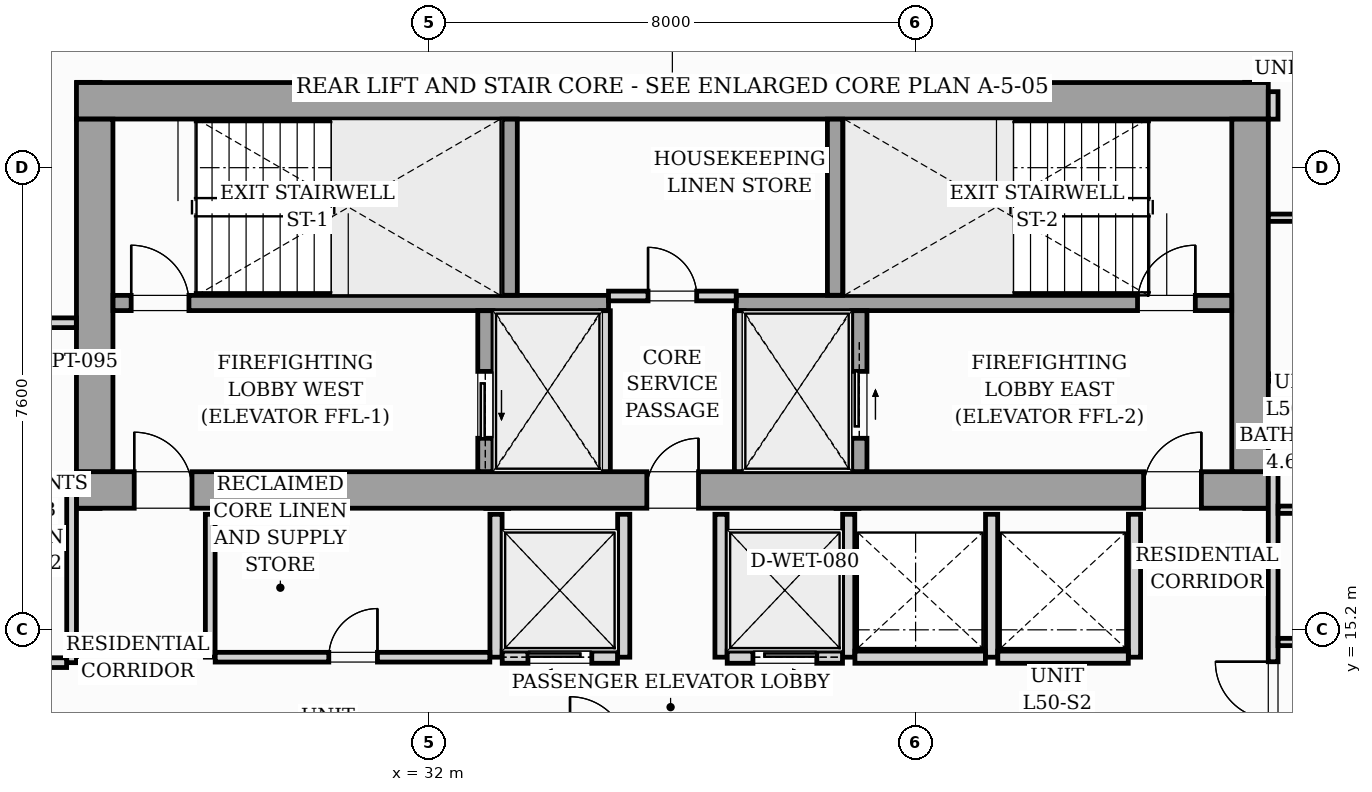
"""IFC4 building model, lengths in metres.
Left out: names, types, materials, properties, quantities, classifications, styles, units other than length and angle.
Written with IfcOpenShell. Run it as: python <this file> out.ifc"""

import sys

from ifc_helpers import new_model, si_unit, direction, frame, frame_2d, origin, origin_2d, place, context, subcontext, project, spatial, rectangle, i_section, extrude, source, transform, mapped, element, fill, save


model = new_model("IFC4")
c1 = context("Model", 3, precision=1e-05, world=origin(), true_north=direction((0.0, 1.0)))
c2 = subcontext(c1, "Body", "Model", "MODEL_VIEW")
j1 = project(units=[si_unit("LENGTHUNIT", "METRE"), si_unit("PLANEANGLEUNIT", "RADIAN")], contexts=[c1])
p1 = place(None, origin())
s1 = spatial("IfcSite", under=j1, at=p1, CompositionType="ELEMENT")
p2 = place(p1, origin())
s2 = spatial("IfcBuilding", under=s1, at=p2, CompositionType="ELEMENT")
p3 = place(p2, frame((0.0, 0.0, 176.2)))
s3 = spatial("IfcBuildingStorey", under=s2, at=p3, CompositionType="ELEMENT", Elevation=176.2)
m1 = source(origin(), c2, "Body", "SweptSolid", [
    extrude(i_section(OverallWidth=0.416, OverallDepth=0.446, WebThickness=0.039, FlangeThickness=0.063, FilletRadius=0.018, at=origin_2d()), origin(), (0.0, 0.0, 1.0), 3.196),
])
for number, where, z_axis, x_axis in (
    (1, (26.4, 17.4, 0.002), (0.0, 0.0, 1.0), (1.0, 0.0, 0.0)),
    (2, (33.12, 17.4, 0.002), (0.0, 0.0, 1.0), (1.0, 0.0, 0.0)),
    (3, (38.88, 17.4, 0.002), (0.0, 0.0, 1.0), (1.0, 0.0, 0.0)),
    (4, (45.6, 17.4, 0.002), (0.0, 0.0, 1.0), (1.0, 0.0, 0.0)),
    (5, (26.4, 24.0, 0.002), (0.0, 0.0, 1.0), (1.0, 0.0, 0.0)),
    (6, (33.12, 24.0, 0.002), (0.0, 0.0, 1.0), (1.0, 0.0, 0.0)),
    (7, (38.88, 24.0, 0.002), (0.0, 0.0, 1.0), (1.0, 0.0, 0.0)),
    (8, (45.6, 24.0, 0.002), (0.0, 0.0, 1.0), (1.0, 0.0, 0.0)),
):
    element("IfcColumn", number, at=place(p3, frame(where, z_axis=z_axis, x_axis=x_axis)), inside=s3, PredefinedType="PILASTER", context=c2, shape_type="MappedRepresentation", body=[
        mapped(m1, transform((0.0, 0.0, 0.0), scale=1.0)),
    ])
p4 = place(p3, frame((15.437, 24.324, 0.0), z_axis=(0.0, 0.0, 1.0), x_axis=(0.995395627913, 0.095851676732, 0.0)))
e9 = element("IfcWall", 9, at=p4, inside=s3, PredefinedType="STANDARD", context=c2, shape_type="SweptSolid", body=[
    extrude(rectangle(XDim=16.1, YDim=0.26, at=frame_2d((8.05, 0.0))), origin(), (0.0, 0.0, 1.0), 2.94),
])
p5 = place(p4, frame((4.97, 0.0, 0.0)))
e10 = element("IfcOpeningElement", 10, at=p5, cuts=e9, PredefinedType="OPENING", context=c2, shape_type="SweptSolid", body=[
    extrude(rectangle(XDim=1.8, YDim=2.06, at=frame_2d((0.9, 1.03))), frame((0.0, 0.14, 0.0), z_axis=(0.0, -1.0, 0.0), x_axis=(1.0, 0.0, 0.0)), (0.0, 0.0, 1.0), 0.28),
])
p6 = place(p4, frame((2.05, 0.0, 0.65)))
e11 = element("IfcOpeningElement", 11, at=p6, cuts=e9, PredefinedType="OPENING", context=c2, shape_type="SweptSolid", body=[
    extrude(rectangle(XDim=1.6, YDim=1.5, at=frame_2d((0.8, 0.75))), frame((0.0, 0.14, 0.0), z_axis=(0.0, -1.0, 0.0), x_axis=(1.0, 0.0, 0.0)), (0.0, 0.0, 1.0), 0.28),
])
p7 = place(p3, frame((26.2, 17.5, 0.0), z_axis=(0.0, 0.0, 1.0), x_axis=(1.0, 0.0, 0.0)))
e12 = element("IfcWall", 12, at=p7, inside=s3, PredefinedType="SHEAR", context=c2, shape_type="SweptSolid", body=[
    extrude(rectangle(XDim=19.6, YDim=0.6, at=frame_2d((9.8, 0.0))), origin(), (0.0, 0.0, 1.0), 3.2),
])
p8 = place(p7, frame((0.95, 0.0, 0.0)))
e13 = element("IfcOpeningElement", 13, at=p8, cuts=e12, PredefinedType="OPENING", context=c2, shape_type="SweptSolid", body=[
    extrude(rectangle(XDim=0.95, YDim=2.06, at=frame_2d((0.475, 1.03))), frame((0.0, 0.31, 0.0), z_axis=(0.0, -1.0, 0.0), x_axis=(1.0, 0.0, 0.0)), (0.0, 0.0, 1.0), 0.62),
])
p9 = place(p7, frame((9.38, 0.0, 0.0)))
e14 = element("IfcOpeningElement", 14, at=p9, cuts=e12, PredefinedType="OPENING", context=c2, shape_type="SweptSolid", body=[
    extrude(rectangle(XDim=0.85, YDim=2.0, at=frame_2d((0.425, 1.0))), frame((0.0, 0.31, 0.0), z_axis=(0.0, -1.0, 0.0), x_axis=(1.0, 0.0, 0.0)), (0.0, 0.0, 1.0), 0.62),
])
p10 = place(p7, frame((17.55, 0.0, 0.0)))
e15 = element("IfcOpeningElement", 15, at=p10, cuts=e12, PredefinedType="OPENING", context=c2, shape_type="SweptSolid", body=[
    extrude(rectangle(XDim=0.95, YDim=2.06, at=frame_2d((0.475, 1.03))), frame((0.0, 0.31, 0.0), z_axis=(0.0, -1.0, 0.0), x_axis=(1.0, 0.0, 0.0)), (0.0, 0.0, 1.0), 0.62),
])
p11 = place(p3, frame((26.2, 23.9, 0.0), z_axis=(0.0, 0.0, 1.0), x_axis=(1.0, 0.0, 0.0)))
e16 = element("IfcWall", 16, at=p11, inside=s3, PredefinedType="SHEAR", context=c2, shape_type="SweptSolid", body=[
    extrude(rectangle(XDim=19.6, YDim=0.6, at=frame_2d((9.8, 0.0))), origin(), (0.0, 0.0, 1.0), 3.2),
])
for number, where, z_axis, x_axis in (
    (17, (26.5, 17.802, 0.0), (0.0, 0.0, 1.0), (0.0, 1.0, 0.0)),
    (18, (45.5, 17.802, 0.0), (0.0, 0.0, 1.0), (0.0, 1.0, 0.0)),
):
    element("IfcWall", number, at=place(p3, frame(where, z_axis=z_axis, x_axis=x_axis)), inside=s3, PredefinedType="SHEAR", context=c2, shape_type="SweptSolid", body=[
        extrude(rectangle(XDim=5.796, YDim=0.6, at=frame_2d((2.898, 0.0))), origin(), (0.0, 0.0, 1.0), 3.2),
    ])
p12 = place(p3, frame((26.802, 20.575, 0.0), z_axis=(0.0, 0.0, 1.0), x_axis=(1.0, 0.0, 0.0)))
e19 = element("IfcWall", 19, at=p12, inside=s3, PredefinedType="SOLIDWALL", context=c2, shape_type="SweptSolid", body=[
    extrude(rectangle(XDim=8.148, YDim=0.25, at=frame_2d((4.074, 0.0))), origin(), (0.0, 0.0, 1.0), 3.2),
])
p13 = place(p12, frame((0.298, 0.0, 0.0)))
e20 = element("IfcOpeningElement", 20, at=p13, cuts=e19, PredefinedType="OPENING", context=c2, shape_type="SweptSolid", body=[
    extrude(rectangle(XDim=0.95, YDim=2.06, at=frame_2d((0.475, 1.03))), frame((0.0, 0.135, 0.0), z_axis=(0.0, -1.0, 0.0), x_axis=(1.0, 0.0, 0.0)), (0.0, 0.0, 1.0), 0.27),
])
p14 = place(p3, frame((37.05, 20.575, 0.0), z_axis=(0.0, 0.0, 1.0), x_axis=(1.0, 0.0, 0.0)))
e21 = element("IfcWall", 21, at=p14, inside=s3, PredefinedType="SOLIDWALL", context=c2, shape_type="SweptSolid", body=[
    extrude(rectangle(XDim=8.148, YDim=0.25, at=frame_2d((4.074, 0.0))), origin(), (0.0, 0.0, 1.0), 3.2),
])
p15 = place(p14, frame((6.6, 0.0, 0.0)))
e22 = element("IfcOpeningElement", 22, at=p15, cuts=e21, PredefinedType="OPENING", context=c2, shape_type="SweptSolid", body=[
    extrude(rectangle(XDim=0.95, YDim=2.06, at=frame_2d((0.475, 1.03))), frame((0.0, 0.135, 0.0), z_axis=(0.0, -1.0, 0.0), x_axis=(1.0, 0.0, 0.0)), (0.0, 0.0, 1.0), 0.27),
])
for number, where, z_axis, x_axis in (
    (23, (33.325, 20.702, 0.0), (0.0, 0.0, 1.0), (0.0, 1.0, 0.0)),
    (24, (38.675, 20.702, 0.0), (0.0, 0.0, 1.0), (0.0, 1.0, 0.0)),
):
    element("IfcWall", number, at=place(p3, frame(where, z_axis=z_axis, x_axis=x_axis)), inside=s3, PredefinedType="SOLIDWALL", context=c2, shape_type="SweptSolid", body=[
        extrude(rectangle(XDim=2.896, YDim=0.25, at=frame_2d((1.448, 0.0))), origin(), (0.0, 0.0, 1.0), 3.2),
    ])
p16 = place(p3, frame((32.925, 17.802, 0.0), z_axis=(0.0, 0.0, 1.0), x_axis=(0.0, 1.0, 0.0)))
e25 = element("IfcWall", 25, at=p16, inside=s3, PredefinedType="SOLIDWALL", context=c2, shape_type="SweptSolid", body=[
    extrude(rectangle(XDim=2.646, YDim=0.25, at=frame_2d((1.323, 0.0))), origin(), (0.0, 0.0, 1.0), 3.2),
])
p17 = place(p16, frame((0.548, 0.0, 0.0)))
e26 = element("IfcOpeningElement", 26, at=p17, cuts=e25, PredefinedType="OPENING", context=c2, shape_type="SweptSolid", body=[
    extrude(rectangle(XDim=1.1, YDim=2.08, at=frame_2d((0.55, 1.04))), frame((0.0, 0.135, 0.0), z_axis=(0.0, -1.0, 0.0), x_axis=(1.0, 0.0, 0.0)), (0.0, 0.0, 1.0), 0.27),
])
for number, where, z_axis, x_axis in (
    (27, (34.9, 17.802, 0.0), (0.0, 0.0, 1.0), (0.0, 1.0, 0.0)),
    (28, (37.1, 17.802, 0.0), (0.0, 0.0, 1.0), (0.0, 1.0, 0.0)),
):
    element("IfcWall", number, at=place(p3, frame(where, z_axis=z_axis, x_axis=x_axis)), inside=s3, PredefinedType="PARTITIONING", context=c2, shape_type="SweptSolid", body=[
        extrude(rectangle(XDim=2.646, YDim=0.16, at=frame_2d((1.323, 0.0))), origin(), (0.0, 0.0, 1.0), 2.94),
    ])
p18 = place(p3, frame((39.075, 17.802, 0.0), z_axis=(0.0, 0.0, 1.0), x_axis=(0.0, 1.0, 0.0)))
e29 = element("IfcWall", 29, at=p18, inside=s3, PredefinedType="SOLIDWALL", context=c2, shape_type="SweptSolid", body=[
    extrude(rectangle(XDim=2.646, YDim=0.25, at=frame_2d((1.323, 0.0))), origin(), (0.0, 0.0, 1.0), 3.2),
])
p19 = place(p18, frame((0.548, 0.0, 0.0)))
e30 = element("IfcOpeningElement", 30, at=p19, cuts=e29, PredefinedType="OPENING", context=c2, shape_type="SweptSolid", body=[
    extrude(rectangle(XDim=1.1, YDim=2.08, at=frame_2d((0.55, 1.04))), frame((0.0, 0.135, 0.0), z_axis=(0.0, -1.0, 0.0), x_axis=(1.0, 0.0, 0.0)), (0.0, 0.0, 1.0), 0.27),
])
p20 = place(p3, frame((34.95, 20.69, 0.0), z_axis=(0.0, 0.0, 1.0), x_axis=(1.0, 0.0, 0.0)))
e31 = element("IfcWall", 31, at=p20, inside=s3, PredefinedType="PARTITIONING", context=c2, shape_type="SweptSolid", body=[
    extrude(rectangle(XDim=2.1, YDim=0.16, at=frame_2d((1.05, 0.0))), origin(), (0.0, 0.0, 1.0), 2.94),
])
p21 = place(p20, frame((0.65, 0.0, 0.0)))
e32 = element("IfcOpeningElement", 32, at=p21, cuts=e31, PredefinedType="OPENING", context=c2, shape_type="SweptSolid", body=[
    extrude(rectangle(XDim=0.8, YDim=2.05, at=frame_2d((0.4, 1.025))), frame((0.0, 0.09, 0.0), z_axis=(0.0, -1.0, 0.0), x_axis=(1.0, 0.0, 0.0)), (0.0, 0.0, 1.0), 0.18),
])
p22 = place(p3, frame((28.4, 14.75, 0.0), z_axis=(0.0, 0.0, 1.0), x_axis=(0.0, 1.0, 0.0)))
e33 = element("IfcWall", 33, at=p22, inside=s3, PredefinedType="PARTITIONING", context=c2, shape_type="SweptSolid", body=[
    extrude(rectangle(XDim=2.35, YDim=0.16, at=frame_2d((1.175, 0.0))), origin(), (0.0, 0.0, 1.0), 2.94),
])
p23 = place(p3, frame((33.1, 14.75, 0.0), z_axis=(0.0, 0.0, 1.0), x_axis=(0.0, 1.0, 0.0)))
e34 = element("IfcWall", 34, at=p23, inside=s3, PredefinedType="PARTITIONING", context=c2, shape_type="SweptSolid", body=[
    extrude(rectangle(XDim=2.35, YDim=0.2, at=frame_2d((1.175, 0.0))), origin(), (0.0, 0.0, 1.0), 2.94),
])
p24 = place(p3, frame((28.482, 14.75, 0.0), z_axis=(0.0, 0.0, 1.0), x_axis=(1.0, 0.0, 0.0)))
e35 = element("IfcWall", 35, at=p24, inside=s3, PredefinedType="PARTITIONING", context=c2, shape_type="SweptSolid", body=[
    extrude(rectangle(XDim=4.516, YDim=0.16, at=frame_2d((2.258, 0.0))), origin(), (0.0, 0.0, 1.0), 2.94),
])
p25 = place(p24, frame((1.868, 0.0, 0.0)))
e36 = element("IfcOpeningElement", 36, at=p25, cuts=e35, PredefinedType="OPENING", context=c2, shape_type="SweptSolid", body=[
    extrude(rectangle(XDim=0.8, YDim=2.05, at=frame_2d((0.4, 1.025))), frame((0.0, 0.09, 0.0), z_axis=(0.0, -1.0, 0.0), x_axis=(1.0, 0.0, 0.0)), (0.0, 0.0, 1.0), 0.18),
])
p26 = place(p3, frame((35.2, 14.75, 0.0), z_axis=(0.0, 0.0, 1.0), x_axis=(0.0, 1.0, 0.0)))
e37 = element("IfcWall", 37, at=p26, inside=s3, PredefinedType="PARTITIONING", context=c2, shape_type="SweptSolid", body=[
    extrude(rectangle(XDim=2.35, YDim=0.2, at=frame_2d((1.175, 0.0))), origin(), (0.0, 0.0, 1.0), 2.94),
])
p27 = place(p3, frame((33.202, 14.75, 0.0), z_axis=(0.0, 0.0, 1.0), x_axis=(1.0, 0.0, 0.0)))
e38 = element("IfcWall", 38, at=p27, inside=s3, PredefinedType="PARTITIONING", context=c2, shape_type="SweptSolid", body=[
    extrude(rectangle(XDim=1.896, YDim=0.2, at=frame_2d((0.948, 0.0))), origin(), (0.0, 0.0, 1.0), 2.94),
])
p28 = place(p27, frame((0.423, 0.0, 0.0)))
e39 = element("IfcOpeningElement", 39, at=p28, cuts=e38, PredefinedType="OPENING", context=c2, shape_type="SweptSolid", body=[
    extrude(rectangle(XDim=1.05, YDim=2.08, at=frame_2d((0.525, 1.04))), frame((0.0, 0.11, 0.0), z_axis=(0.0, -1.0, 0.0), x_axis=(1.0, 0.0, 0.0)), (0.0, 0.0, 1.0), 0.22),
])
for number, where, z_axis, x_axis in (
    (40, (36.8, 14.75, 0.0), (0.0, 0.0, 1.0), (0.0, 1.0, 0.0)),
    (41, (38.9, 14.75, 0.0), (0.0, 0.0, 1.0), (0.0, 1.0, 0.0)),
):
    element("IfcWall", number, at=place(p3, frame(where, z_axis=z_axis, x_axis=x_axis)), inside=s3, PredefinedType="PARTITIONING", context=c2, shape_type="SweptSolid", body=[
        extrude(rectangle(XDim=2.35, YDim=0.2, at=frame_2d((1.175, 0.0))), origin(), (0.0, 0.0, 1.0), 2.94),
    ])
p29 = place(p3, frame((36.902, 14.75, 0.0), z_axis=(0.0, 0.0, 1.0), x_axis=(1.0, 0.0, 0.0)))
e42 = element("IfcWall", 42, at=p29, inside=s3, PredefinedType="PARTITIONING", context=c2, shape_type="SweptSolid", body=[
    extrude(rectangle(XDim=1.896, YDim=0.2, at=frame_2d((0.948, 0.0))), origin(), (0.0, 0.0, 1.0), 2.94),
])
p30 = place(p29, frame((0.423, 0.0, 0.0)))
e43 = element("IfcOpeningElement", 43, at=p30, cuts=e42, PredefinedType="OPENING", context=c2, shape_type="SweptSolid", body=[
    extrude(rectangle(XDim=1.05, YDim=2.08, at=frame_2d((0.525, 1.04))), frame((0.0, 0.11, 0.0), z_axis=(0.0, -1.0, 0.0), x_axis=(1.0, 0.0, 0.0)), (0.0, 0.0, 1.0), 0.22),
])
for number, where, z_axis, x_axis in (
    (44, (41.25, 14.75, 0.0), (0.0, 0.0, 1.0), (0.0, 1.0, 0.0)),
    (45, (43.6, 14.75, 0.0), (0.0, 0.0, 1.0), (0.0, 1.0, 0.0)),
):
    element("IfcWall", number, at=place(p3, frame(where, z_axis=z_axis, x_axis=x_axis)), inside=s3, PredefinedType="PARTITIONING", context=c2, shape_type="SweptSolid", body=[
        extrude(rectangle(XDim=2.35, YDim=0.2, at=frame_2d((1.175, 0.0))), origin(), (0.0, 0.0, 1.0), 2.94),
    ])
for number, where, z_axis, x_axis in (
    (46, (39.002, 14.75, 0.0), (0.0, 0.0, 1.0), (1.0, 0.0, 0.0)),
    (47, (41.352, 14.75, 0.0), (0.0, 0.0, 1.0), (1.0, 0.0, 0.0)),
):
    element("IfcWall", number, at=place(p3, frame(where, z_axis=z_axis, x_axis=x_axis)), inside=s3, PredefinedType="PARTITIONING", context=c2, shape_type="SweptSolid", body=[
        extrude(rectangle(XDim=2.146, YDim=0.2, at=frame_2d((1.073, 0.0))), origin(), (0.0, 0.0, 1.0), 2.94),
    ])
p31 = place(p3, frame((45.88, 13.232, 0.0), z_axis=(0.0, 0.0, 1.0), x_axis=(0.0, 1.0, 0.0)))
e48 = element("IfcWall", 48, at=p31, inside=s3, PredefinedType="PARTITIONING", context=c2, shape_type="SweptSolid", body=[
    extrude(rectangle(XDim=4.57, YDim=0.16, at=frame_2d((2.285, 0.0))), origin(), (0.0, 0.0, 1.0), 2.94),
])
p32 = place(p31, frame((0.493, 0.0, 0.0)))
e49 = element("IfcOpeningElement", 49, at=p32, cuts=e48, PredefinedType="OPENING", context=c2, shape_type="SweptSolid", body=[
    extrude(rectangle(XDim=0.95, YDim=2.06, at=frame_2d((0.475, 1.03))), frame((0.0, 0.09, 0.0), z_axis=(0.0, -1.0, 0.0), x_axis=(1.0, 0.0, 0.0)), (0.0, 0.0, 1.0), 0.18),
])
p33 = place(p3, frame((45.88, 23.598, 0.0), z_axis=(0.0, 0.0, 1.0), x_axis=(0.0, 1.0, 0.0)))
e50 = element("IfcWall", 50, at=p33, inside=s3, PredefinedType="PARTITIONING", context=c2, shape_type="SweptSolid", body=[
    extrude(rectangle(XDim=0.452, YDim=0.16, at=frame_2d((0.226, 0.0))), origin(), (0.0, 0.0, 1.0), 2.94),
])
for number, where, z_axis, x_axis in (
    (51, (45.962, 17.175, 0.0), (0.0, 0.0, 1.0), (1.0, 0.0, 0.0)),
    (52, (45.962, 15.0, 0.0), (0.0, 0.0, 1.0), (1.0, 0.0, 0.0)),
):
    element("IfcWall", number, at=place(p3, frame(where, z_axis=z_axis, x_axis=x_axis)), inside=s3, PredefinedType="PARTITIONING", context=c2, shape_type="SweptSolid", body=[
        extrude(rectangle(XDim=2.256, YDim=0.12, at=frame_2d((1.128, 0.0))), origin(), (0.0, 0.0, 1.0), 2.94),
    ])
p34 = place(p3, frame((45.802, 19.35, 0.0), z_axis=(0.0, 0.0, 1.0), x_axis=(1.0, 0.0, 0.0)))
e53 = element("IfcWall", 53, at=p34, inside=s3, PredefinedType="PARTITIONING", context=c2, shape_type="SweptSolid", body=[
    extrude(rectangle(XDim=2.416, YDim=0.12, at=frame_2d((1.208, 0.0))), origin(), (0.0, 0.0, 1.0), 2.94),
])
p35 = place(p3, frame((45.802, 21.977, 0.0), z_axis=(0.0, 0.0, 1.0), x_axis=(1.0, 0.0, 0.0)))
e54 = element("IfcWall", 54, at=p35, inside=s3, PredefinedType="PARTITIONING", context=c2, shape_type="SweptSolid", body=[
    extrude(rectangle(XDim=18.504, YDim=0.12, at=frame_2d((9.252, 0.0))), origin(), (0.0, 0.0, 1.0), 2.94),
])
p36 = place(p35, frame((8.913, 0.0, 0.0)))
e55 = element("IfcOpeningElement", 55, at=p36, cuts=e54, PredefinedType="OPENING", context=c2, shape_type="SweptSolid", body=[
    extrude(rectangle(XDim=0.85, YDim=2.05, at=frame_2d((0.425, 1.025))), frame((0.0, 0.07, 0.0), z_axis=(0.0, -1.0, 0.0), x_axis=(1.0, 0.0, 0.0)), (0.0, 0.0, 1.0), 0.14),
])
p37 = place(p3, frame((24.732, 20.25, 0.0), z_axis=(0.0, 0.0, 1.0), x_axis=(1.0, 0.0, 0.0)))
e56 = element("IfcWall", 56, at=p37, inside=s3, PredefinedType="PARTITIONING", context=c2, shape_type="SweptSolid", body=[
    extrude(rectangle(XDim=1.466, YDim=0.16, at=frame_2d((0.733, 0.0))), origin(), (0.0, 0.0, 1.0), 2.94),
])
p38 = place(p3, frame((26.12, 14.66, 0.0), z_axis=(0.0, 0.0, 1.0), x_axis=(0.0, 1.0, 0.0)))
e57 = element("IfcWall", 57, at=p38, inside=s3, PredefinedType="PARTITIONING", context=c2, shape_type="SweptSolid", body=[
    extrude(rectangle(XDim=2.79, YDim=0.16, at=frame_2d((1.395, 0.0))), origin(), (0.0, 0.0, 1.0), 2.94),
])
p39 = place(p3, frame((24.732, 14.66, 0.0), z_axis=(0.0, 0.0, 1.0), x_axis=(1.0, 0.0, 0.0)))
e58 = element("IfcWall", 58, at=p39, inside=s3, PredefinedType="PARTITIONING", context=c2, shape_type="SweptSolid", body=[
    extrude(rectangle(XDim=1.306, YDim=0.16, at=frame_2d((0.653, 0.0))), origin(), (0.0, 0.0, 1.0), 2.94),
])
m2 = source(origin(), c2, "Body", "SweptSolid", [
    extrude(rectangle(XDim=0.95, YDim=2.06, at=frame_2d((0.475, 1.03))), frame((0.0, 0.025, 0.0), z_axis=(0.0, -1.0, 0.0), x_axis=(1.0, 0.0, 0.0)), (0.0, 0.0, 1.0), 0.05),
])
p40 = place(p8, origin())
e59 = element("IfcDoor", 59, at=p40, inside=s3, OperationType="SINGLE_SWING_LEFT", PredefinedType="DOOR", context=c2, shape_type="MappedRepresentation", body=[
    mapped(m2, transform((0.0, 0.0, 0.0), scale=1.0)),
])
fill(e13, e59)
m3 = source(origin(), c2, "Body", "SweptSolid", [
    extrude(rectangle(XDim=0.85, YDim=2.0, at=frame_2d((0.425, 1.0))), frame((0.0, 0.025, 0.0), z_axis=(0.0, -1.0, 0.0), x_axis=(1.0, 0.0, 0.0)), (0.0, 0.0, 1.0), 0.05),
])
p41 = place(p9, origin())
e60 = element("IfcDoor", 60, at=p41, inside=s3, OperationType="SINGLE_SWING_RIGHT", PredefinedType="DOOR", context=c2, shape_type="MappedRepresentation", body=[
    mapped(m3, transform((0.0, 0.0, 0.0), scale=1.0)),
])
fill(e14, e60)
p42 = place(p10, origin())
e61 = element("IfcDoor", 61, at=p42, inside=s3, OperationType="SINGLE_SWING_RIGHT", PredefinedType="DOOR", context=c2, shape_type="MappedRepresentation", body=[
    mapped(m2, transform((0.0, 0.0, 0.0), scale=1.0)),
])
fill(e15, e61)
p43 = place(p13, origin())
e62 = element("IfcDoor", 62, at=p43, inside=s3, OperationType="SINGLE_SWING_LEFT", PredefinedType="DOOR", context=c2, shape_type="MappedRepresentation", body=[
    mapped(m2, transform((0.0, 0.0, 0.0), scale=1.0)),
])
fill(e20, e62)
p44 = place(p15, origin())
e63 = element("IfcDoor", 63, at=p44, inside=s3, OperationType="SINGLE_SWING_RIGHT", PredefinedType="DOOR", context=c2, shape_type="MappedRepresentation", body=[
    mapped(m2, transform((0.0, 0.0, 0.0), scale=1.0)),
])
fill(e22, e63)
m4 = source(origin(), c2, "Body", "SweptSolid", [
    extrude(rectangle(XDim=1.1, YDim=2.08, at=frame_2d((0.55, 1.04))), frame((0.0, 0.025, 0.0), z_axis=(0.0, -1.0, 0.0), x_axis=(1.0, 0.0, 0.0)), (0.0, 0.0, 1.0), 0.05),
])
p45 = place(p17, origin())
e64 = element("IfcDoor", 64, at=p45, inside=s3, OperationType="SLIDING_TO_LEFT", PredefinedType="DOOR", context=c2, shape_type="MappedRepresentation", body=[
    mapped(m4, transform((0.0, 0.0, 0.0), scale=1.0)),
])
fill(e26, e64)
p46 = place(p19, origin())
e65 = element("IfcDoor", 65, at=p46, inside=s3, OperationType="SLIDING_TO_RIGHT", PredefinedType="DOOR", context=c2, shape_type="MappedRepresentation", body=[
    mapped(m4, transform((0.0, 0.0, 0.0), scale=1.0)),
])
fill(e30, e65)
m5 = source(origin(), c2, "Body", "SweptSolid", [
    extrude(rectangle(XDim=0.8, YDim=2.05, at=frame_2d((0.4, 1.025))), frame((0.0, 0.025, 0.0), z_axis=(0.0, -1.0, 0.0), x_axis=(1.0, 0.0, 0.0)), (0.0, 0.0, 1.0), 0.05),
])
p47 = place(p21, origin())
e66 = element("IfcDoor", 66, at=p47, inside=s3, OperationType="SINGLE_SWING_LEFT", PredefinedType="DOOR", context=c2, shape_type="MappedRepresentation", body=[
    mapped(m5, transform((0.0, 0.0, 0.0), scale=1.0)),
])
fill(e32, e66)
p48 = place(p25, origin())
e67 = element("IfcDoor", 67, at=p48, inside=s3, OperationType="SINGLE_SWING_RIGHT", PredefinedType="DOOR", context=c2, shape_type="MappedRepresentation", body=[
    mapped(m5, transform((0.0, 0.0, 0.0), scale=1.0)),
])
fill(e36, e67)
m6 = source(origin(), c2, "Body", "SweptSolid", [
    extrude(rectangle(XDim=1.05, YDim=2.08, at=frame_2d((0.525, 1.04))), frame((0.0, 0.025, 0.0), z_axis=(0.0, -1.0, 0.0), x_axis=(1.0, 0.0, 0.0)), (0.0, 0.0, 1.0), 0.05),
])
p49 = place(p28, origin())
e68 = element("IfcDoor", 68, at=p49, inside=s3, OperationType="SLIDING_TO_LEFT", PredefinedType="DOOR", context=c2, shape_type="MappedRepresentation", body=[
    mapped(m6, transform((0.0, 0.0, 0.0), scale=1.0)),
])
fill(e39, e68)
p50 = place(p30, origin())
e69 = element("IfcDoor", 69, at=p50, inside=s3, OperationType="SLIDING_TO_RIGHT", PredefinedType="DOOR", context=c2, shape_type="MappedRepresentation", body=[
    mapped(m6, transform((0.0, 0.0, 0.0), scale=1.0)),
])
fill(e43, e69)
m7 = source(origin(), c2, "Body", "SweptSolid", [
    extrude(rectangle(XDim=0.95, YDim=2.06, at=frame_2d((0.475, 1.03))), frame((0.0, 0.025, 0.0), z_axis=(0.0, -1.0, 0.0), x_axis=(1.0, 0.0, 0.0)), (0.0, 0.0, 1.0), 0.05),
])
p51 = place(p32, origin())
e70 = element("IfcDoor", 70, at=p51, inside=s3, OperationType="SINGLE_SWING_RIGHT", PredefinedType="DOOR", context=c2, shape_type="MappedRepresentation", body=[
    mapped(m7, transform((0.0, 0.0, 0.0), scale=1.0)),
])
fill(e49, e70)
save(model, sys.argv[1])
